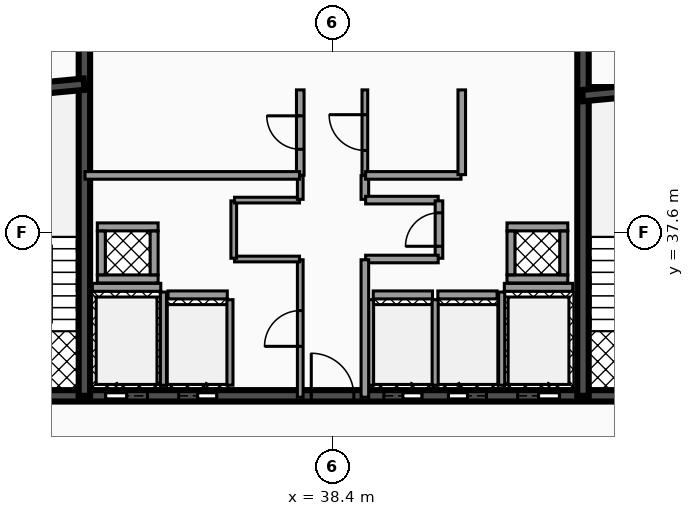
"""IFC4 building model, lengths in metres.
Left out: names, types, materials, properties, quantities, classifications, styles, units other than length and angle.
Written with IfcOpenShell. Run it as: python <this file> out.ifc"""

import sys

from ifc_helpers import new_model, si_unit, direction, frame, frame_2d, origin, place, context, subcontext, project, spatial, rectangle, extrude, element, fill, save


model = new_model("IFC4")
c1 = context("Model", 3, precision=1e-05, world=origin(), true_north=direction((0.0, 1.0)))
c2 = subcontext(c1, "Body", "Model", "MODEL_VIEW")
j1 = project(units=[si_unit("LENGTHUNIT", "METRE"), si_unit("PLANEANGLEUNIT", "RADIAN")], contexts=[c1])
p1 = place(None, origin())
s1 = spatial("IfcSite", under=j1, at=p1, CompositionType="ELEMENT")
p2 = place(p1, origin())
s2 = spatial("IfcBuilding", under=s1, at=p2, CompositionType="ELEMENT")
p3 = place(p2, frame((0.0, 0.0, 258.4)))
s3 = spatial("IfcBuildingStorey", under=s2, at=p3, CompositionType="ELEMENT", Elevation=258.4)
p4 = place(p3, frame((28.5, 33.3, 0.0), z_axis=(0.0, 0.0, 1.0), x_axis=(1.0, 0.0, 0.0)))
e1 = element("IfcWall", 1, at=p4, inside=s3, PredefinedType="SHEAR", context=c2, shape_type="SweptSolid", body=[
    extrude(rectangle(XDim=19.86, YDim=0.3, at=frame_2d((9.93, 0.0))), origin(), (0.0, 0.0, 1.0), 3.18),
])
p5 = place(p4, frame((3.93, 0.0, 0.0)))
e2 = element("IfcOpeningElement", 2, at=p5, cuts=e1, PredefinedType="OPENING", context=c2, shape_type="SweptSolid", body=[
    extrude(rectangle(XDim=1.1, YDim=2.15, at=frame_2d((0.55, 1.075))), frame((0.0, 0.16, 0.0), z_axis=(0.0, -1.0, 0.0), x_axis=(1.0, 0.0, 0.0)), (0.0, 0.0, 1.0), 0.32),
])
p6 = place(p4, frame((14.77, 0.0, 0.0)))
e3 = element("IfcOpeningElement", 3, at=p6, cuts=e1, PredefinedType="OPENING", context=c2, shape_type="SweptSolid", body=[
    extrude(rectangle(XDim=1.1, YDim=2.15, at=frame_2d((0.55, 1.075))), frame((0.0, 0.16, 0.0), z_axis=(0.0, -1.0, 0.0), x_axis=(1.0, 0.0, 0.0)), (0.0, 0.0, 1.0), 0.32),
])
p7 = place(p4, frame((11.25, 0.0, 0.0)))
e4 = element("IfcOpeningElement", 4, at=p7, cuts=e1, PredefinedType="OPENING", context=c2, shape_type="SweptSolid", body=[
    extrude(rectangle(XDim=1.0, YDim=2.1, at=frame_2d((0.5, 1.05))), frame((0.0, 0.16, 0.0), z_axis=(0.0, -1.0, 0.0), x_axis=(1.0, 0.0, 0.0)), (0.0, 0.0, 1.0), 0.32),
])
p8 = place(p4, frame((12.95, 0.0, 0.0)))
e5 = element("IfcOpeningElement", 5, at=p8, cuts=e1, PredefinedType="OPENING", context=c2, shape_type="SweptSolid", body=[
    extrude(rectangle(XDim=1.0, YDim=2.1, at=frame_2d((0.5, 1.05))), frame((0.0, 0.16, 0.0), z_axis=(0.0, -1.0, 0.0), x_axis=(1.0, 0.0, 0.0)), (0.0, 0.0, 1.0), 0.32),
])
p9 = place(p4, frame((5.85, 0.0, 0.0)))
e6 = element("IfcOpeningElement", 6, at=p9, cuts=e1, PredefinedType="OPENING", context=c2, shape_type="SweptSolid", body=[
    extrude(rectangle(XDim=1.0, YDim=2.1, at=frame_2d((0.5, 1.05))), frame((0.0, 0.16, 0.0), z_axis=(0.0, -1.0, 0.0), x_axis=(1.0, 0.0, 0.0)), (0.0, 0.0, 1.0), 0.32),
])
p10 = place(p4, frame((1.21, 0.0, 0.0)))
e7 = element("IfcOpeningElement", 7, at=p10, cuts=e1, PredefinedType="OPENING", context=c2, shape_type="SweptSolid", body=[
    extrude(rectangle(XDim=1.1, YDim=2.2, at=frame_2d((0.55, 1.1))), frame((0.0, 0.16, 0.0), z_axis=(0.0, -1.0, 0.0), x_axis=(1.0, 0.0, 0.0)), (0.0, 0.0, 1.0), 0.32),
])
p11 = place(p4, frame((9.34, 0.0, 0.0)))
e8 = element("IfcOpeningElement", 8, at=p11, cuts=e1, PredefinedType="OPENING", context=c2, shape_type="SweptSolid", body=[
    extrude(rectangle(XDim=1.12, YDim=2.05, at=frame_2d((0.56, 1.025))), frame((0.0, 0.16, 0.0), z_axis=(0.0, -1.0, 0.0), x_axis=(1.0, 0.0, 0.0)), (0.0, 0.0, 1.0), 0.32),
])
p12 = place(p4, frame((17.55, 0.0, 0.0)))
e9 = element("IfcOpeningElement", 9, at=p12, cuts=e1, PredefinedType="OPENING", context=c2, shape_type="SweptSolid", body=[
    extrude(rectangle(XDim=1.1, YDim=2.2, at=frame_2d((0.55, 1.1))), frame((0.0, 0.16, 0.0), z_axis=(0.0, -1.0, 0.0), x_axis=(1.0, 0.0, 0.0)), (0.0, 0.0, 1.0), 0.32),
])
for number, where, z_axis, x_axis in (
    (10, (31.87, 33.3, 0.0), (0.0, 0.0, 1.0), (0.0, 1.0, 0.0)),
    (11, (44.99, 33.3, 0.0), (0.0, 0.0, 1.0), (0.0, 1.0, 0.0)),
):
    element("IfcWall", number, at=place(p3, frame(where, z_axis=z_axis, x_axis=x_axis)), inside=s3, PredefinedType="SHEAR", context=c2, shape_type="SweptSolid", body=[
        extrude(rectangle(XDim=10.1, YDim=0.3, at=frame_2d((5.05, 0.0))), origin(), (0.0, 0.0, 1.0), 3.18),
    ])
p13 = place(p3, frame((28.64, 41.2, 0.0), z_axis=(0.0, 0.0, 1.0), x_axis=(0.995687118776, 0.092774789157, 0.0)))
e12 = element("IfcWall", 12, at=p13, inside=s3, PredefinedType="SHEAR", context=c2, shape_type="SweptSolid", body=[
    extrude(rectangle(XDim=3.234, YDim=0.3, at=frame_2d((1.617, 0.0))), origin(), (0.0, 0.0, 1.0), 3.18),
])
p14 = place(p3, frame((44.98, 41.2, 0.0), z_axis=(0.0, 0.0, 1.0), x_axis=(0.995686468965, 0.09278176286, 0.0)))
e13 = element("IfcWall", 13, at=p14, inside=s3, PredefinedType="SHEAR", context=c2, shape_type="SweptSolid", body=[
    extrude(rectangle(XDim=3.234, YDim=0.3, at=frame_2d((1.617, 0.0))), origin(), (0.0, 0.0, 1.0), 3.18),
])
p15 = place(p3, frame((32.08, 36.155, 0.0), z_axis=(0.0, 0.0, 1.0), x_axis=(1.0, 0.0, 0.0)))
e14 = element("IfcWall", 14, at=p15, inside=s3, PredefinedType="SOLIDWALL", context=c2, shape_type="SweptSolid", body=[
    extrude(rectangle(XDim=1.8, YDim=0.21, at=frame_2d((0.9, 0.0))), origin(), (0.0, 0.0, 1.0), 3.18),
])
p16 = place(p3, frame((33.95, 33.58, 0.0), z_axis=(0.0, 0.0, 1.0), x_axis=(0.0, 1.0, 0.0)))
e15 = element("IfcWall", 15, at=p16, inside=s3, PredefinedType="SOLIDWALL", context=c2, shape_type="SweptSolid", body=[
    extrude(rectangle(XDim=2.45, YDim=0.16, at=frame_2d((1.225, 0.0))), origin(), (0.0, 0.0, 1.0), 3.18),
])
p17 = place(p3, frame((42.92, 36.155, 0.0), z_axis=(0.0, 0.0, 1.0), x_axis=(1.0, 0.0, 0.0)))
e16 = element("IfcWall", 16, at=p17, inside=s3, PredefinedType="SOLIDWALL", context=c2, shape_type="SweptSolid", body=[
    extrude(rectangle(XDim=1.8, YDim=0.21, at=frame_2d((0.9, 0.0))), origin(), (0.0, 0.0, 1.0), 3.18),
])
p18 = place(p3, frame((42.85, 33.58, 0.0), z_axis=(0.0, 0.0, 1.0), x_axis=(0.0, 1.0, 0.0)))
e17 = element("IfcWall", 17, at=p18, inside=s3, PredefinedType="SOLIDWALL", context=c2, shape_type="SweptSolid", body=[
    extrude(rectangle(XDim=2.45, YDim=0.16, at=frame_2d((1.225, 0.0))), origin(), (0.0, 0.0, 1.0), 3.18),
])
p19 = place(p3, frame((39.47, 35.955, 0.0), z_axis=(0.0, 0.0, 1.0), x_axis=(1.0, 0.0, 0.0)))
e18 = element("IfcWall", 18, at=p19, inside=s3, PredefinedType="SOLIDWALL", context=c2, shape_type="SweptSolid", body=[
    extrude(rectangle(XDim=1.56, YDim=0.21, at=frame_2d((0.78, 0.0))), origin(), (0.0, 0.0, 1.0), 3.18),
])
for number, where, z_axis, x_axis in (
    (19, (39.4, 33.58, 0.0), (0.0, 0.0, 1.0), (0.0, 1.0, 0.0)),
    (20, (41.1, 33.58, 0.0), (0.0, 0.0, 1.0), (0.0, 1.0, 0.0)),
):
    element("IfcWall", number, at=place(p3, frame(where, z_axis=z_axis, x_axis=x_axis)), inside=s3, PredefinedType="SOLIDWALL", context=c2, shape_type="SweptSolid", body=[
        extrude(rectangle(XDim=2.25, YDim=0.16, at=frame_2d((1.125, 0.0))), origin(), (0.0, 0.0, 1.0), 3.18),
    ])
p20 = place(p3, frame((41.17, 35.955, 0.0), z_axis=(0.0, 0.0, 1.0), x_axis=(1.0, 0.0, 0.0)))
e21 = element("IfcWall", 21, at=p20, inside=s3, PredefinedType="SOLIDWALL", context=c2, shape_type="SweptSolid", body=[
    extrude(rectangle(XDim=1.56, YDim=0.21, at=frame_2d((0.78, 0.0))), origin(), (0.0, 0.0, 1.0), 3.18),
])
p21 = place(p3, frame((34.07, 35.955, 0.0), z_axis=(0.0, 0.0, 1.0), x_axis=(1.0, 0.0, 0.0)))
e22 = element("IfcWall", 22, at=p21, inside=s3, PredefinedType="SOLIDWALL", context=c2, shape_type="SweptSolid", body=[
    extrude(rectangle(XDim=1.56, YDim=0.21, at=frame_2d((0.78, 0.0))), origin(), (0.0, 0.0, 1.0), 3.18),
])
p22 = place(p3, frame((35.7, 33.58, 0.0), z_axis=(0.0, 0.0, 1.0), x_axis=(0.0, 1.0, 0.0)))
e23 = element("IfcWall", 23, at=p22, inside=s3, PredefinedType="SOLIDWALL", context=c2, shape_type="SweptSolid", body=[
    extrude(rectangle(XDim=2.25, YDim=0.16, at=frame_2d((1.125, 0.0))), origin(), (0.0, 0.0, 1.0), 3.18),
])
for number, where, z_axis, x_axis in (
    (24, (32.21, 36.375, 0.0), (0.0, 0.0, 1.0), (1.0, 0.0, 0.0)),
    (25, (32.21, 37.745, 0.0), (0.0, 0.0, 1.0), (1.0, 0.0, 0.0)),
):
    element("IfcWall", number, at=place(p3, frame(where, z_axis=z_axis, x_axis=x_axis)), inside=s3, PredefinedType="SOLIDWALL", context=c2, shape_type="SweptSolid", body=[
        extrude(rectangle(XDim=1.6, YDim=0.21, at=frame_2d((0.8, 0.0))), origin(), (0.0, 0.0, 1.0), 3.18),
    ])
for number, where, z_axis, x_axis in (
    (26, (32.315, 36.485, 0.0), (0.0, 0.0, 1.0), (0.0, 1.0, 0.0)),
    (27, (33.705, 36.485, 0.0), (0.0, 0.0, 1.0), (0.0, 1.0, 0.0)),
):
    element("IfcWall", number, at=place(p3, frame(where, z_axis=z_axis, x_axis=x_axis)), inside=s3, PredefinedType="SOLIDWALL", context=c2, shape_type="SweptSolid", body=[
        extrude(rectangle(XDim=1.15, YDim=0.21, at=frame_2d((0.575, 0.0))), origin(), (0.0, 0.0, 1.0), 3.18),
    ])
for number, where, z_axis, x_axis in (
    (28, (42.99, 36.375, 0.0), (0.0, 0.0, 1.0), (1.0, 0.0, 0.0)),
    (29, (42.99, 37.745, 0.0), (0.0, 0.0, 1.0), (1.0, 0.0, 0.0)),
):
    element("IfcWall", number, at=place(p3, frame(where, z_axis=z_axis, x_axis=x_axis)), inside=s3, PredefinedType="SOLIDWALL", context=c2, shape_type="SweptSolid", body=[
        extrude(rectangle(XDim=1.6, YDim=0.21, at=frame_2d((0.8, 0.0))), origin(), (0.0, 0.0, 1.0), 3.18),
    ])
for number, where, z_axis, x_axis in (
    (30, (43.095, 36.485, 0.0), (0.0, 0.0, 1.0), (0.0, 1.0, 0.0)),
    (31, (44.485, 36.485, 0.0), (0.0, 0.0, 1.0), (0.0, 1.0, 0.0)),
):
    element("IfcWall", number, at=place(p3, frame(where, z_axis=z_axis, x_axis=x_axis)), inside=s3, PredefinedType="SOLIDWALL", context=c2, shape_type="SweptSolid", body=[
        extrude(rectangle(XDim=1.15, YDim=0.21, at=frame_2d((0.575, 0.0))), origin(), (0.0, 0.0, 1.0), 3.18),
    ])
p23 = place(p3, frame((37.55, 33.265, 0.0), z_axis=(0.0, 0.0, 1.0), x_axis=(0.0, 1.0, 0.0)))
e32 = element("IfcWall", 32, at=p23, inside=s3, PredefinedType="PARTITIONING", context=c2, shape_type="SweptSolid", body=[
    extrude(rectangle(XDim=3.615, YDim=0.15, at=frame_2d((1.808, 0.0))), origin(), (0.0, 0.0, 1.0), 2.235),
])
p24 = place(p23, frame((1.337, 0.0, 0.0)))
e33 = element("IfcOpeningElement", 33, at=p24, cuts=e32, PredefinedType="OPENING", context=c2, shape_type="SweptSolid", body=[
    extrude(rectangle(XDim=0.94, YDim=2.05, at=frame_2d((0.47, 1.025))), frame((0.0, 0.085, 0.0), z_axis=(0.0, -1.0, 0.0), x_axis=(1.0, 0.0, 0.0)), (0.0, 0.0, 1.0), 0.17),
])
p25 = place(p3, frame((35.82, 36.9, 0.0), z_axis=(0.0, 0.0, 1.0), x_axis=(1.0, 0.0, 0.0)))
e34 = element("IfcWall", 34, at=p25, inside=s3, PredefinedType="PARTITIONING", context=c2, shape_type="SweptSolid", body=[
    extrude(rectangle(XDim=1.71, YDim=0.15, at=frame_2d((0.855, 0.0))), origin(), (0.0, 0.0, 1.0), 2.235),
])
p26 = place(p3, frame((35.8, 36.92, 0.0), z_axis=(0.0, 0.0, 1.0), x_axis=(0.0, 1.0, 0.0)))
e35 = element("IfcWall", 35, at=p26, inside=s3, PredefinedType="PARTITIONING", context=c2, shape_type="SweptSolid", body=[
    extrude(rectangle(XDim=1.51, YDim=0.15, at=frame_2d((0.755, 0.0))), origin(), (0.0, 0.0, 1.0), 2.235),
])
p27 = place(p3, frame((35.82, 38.45, 0.0), z_axis=(0.0, 0.0, 1.0), x_axis=(1.0, 0.0, 0.0)))
e36 = element("IfcWall", 36, at=p27, inside=s3, PredefinedType="PARTITIONING", context=c2, shape_type="SweptSolid", body=[
    extrude(rectangle(XDim=1.71, YDim=0.15, at=frame_2d((0.855, 0.0))), origin(), (0.0, 0.0, 1.0), 2.235),
])
p28 = place(p3, frame((37.55, 38.47, 0.0), z_axis=(0.0, 0.0, 1.0), x_axis=(0.0, 1.0, 0.0)))
e37 = element("IfcWall", 37, at=p28, inside=s3, PredefinedType="PARTITIONING", context=c2, shape_type="SweptSolid", body=[
    extrude(rectangle(XDim=0.625, YDim=0.15, at=frame_2d((0.312, 0.0))), origin(), (0.0, 0.0, 1.0), 2.235),
])
p29 = place(p3, frame((37.55, 39.105, 0.0), z_axis=(0.0, 0.0, 1.0), x_axis=(0.0, 1.0, 0.0)))
e38 = element("IfcWall", 38, at=p29, inside=s3, PredefinedType="PARTITIONING", context=c2, shape_type="SweptSolid", body=[
    extrude(rectangle(XDim=2.245, YDim=0.2, at=frame_2d((1.123, 0.0))), origin(), (0.0, 0.0, 1.0), 2.235),
])
p30 = place(p29, frame((0.683, 0.0, 0.0)))
e39 = element("IfcOpeningElement", 39, at=p30, cuts=e38, PredefinedType="OPENING", context=c2, shape_type="SweptSolid", body=[
    extrude(rectangle(XDim=0.88, YDim=2.05, at=frame_2d((0.44, 1.025))), frame((0.0, 0.11, 0.0), z_axis=(0.0, -1.0, 0.0), x_axis=(1.0, 0.0, 0.0)), (0.0, 0.0, 1.0), 0.22),
])
p31 = place(p3, frame((39.25, 38.47, 0.0), z_axis=(0.0, 0.0, 1.0), x_axis=(0.0, 1.0, 0.0)))
e40 = element("IfcWall", 40, at=p31, inside=s3, PredefinedType="PARTITIONING", context=c2, shape_type="SweptSolid", body=[
    extrude(rectangle(XDim=0.625, YDim=0.2, at=frame_2d((0.312, 0.0))), origin(), (0.0, 0.0, 1.0), 2.235),
])
p32 = place(p3, frame((39.27, 38.45, 0.0), z_axis=(0.0, 0.0, 1.0), x_axis=(1.0, 0.0, 0.0)))
e41 = element("IfcWall", 41, at=p32, inside=s3, PredefinedType="PARTITIONING", context=c2, shape_type="SweptSolid", body=[
    extrude(rectangle(XDim=1.91, YDim=0.2, at=frame_2d((0.955, 0.0))), origin(), (0.0, 0.0, 1.0), 2.235),
])
p33 = place(p3, frame((41.2, 36.92, 0.0), z_axis=(0.0, 0.0, 1.0), x_axis=(0.0, 1.0, 0.0)))
e42 = element("IfcWall", 42, at=p33, inside=s3, PredefinedType="PARTITIONING", context=c2, shape_type="SweptSolid", body=[
    extrude(rectangle(XDim=1.51, YDim=0.2, at=frame_2d((0.755, 0.0))), origin(), (0.0, 0.0, 1.0), 2.235),
])
p34 = place(p33, frame((0.315, 0.0, 0.0)))
e43 = element("IfcOpeningElement", 43, at=p34, cuts=e42, PredefinedType="OPENING", context=c2, shape_type="SweptSolid", body=[
    extrude(rectangle(XDim=0.88, YDim=2.05, at=frame_2d((0.44, 1.025))), frame((0.0, 0.11, 0.0), z_axis=(0.0, -1.0, 0.0), x_axis=(1.0, 0.0, 0.0)), (0.0, 0.0, 1.0), 0.22),
])
p35 = place(p3, frame((39.27, 36.9, 0.0), z_axis=(0.0, 0.0, 1.0), x_axis=(1.0, 0.0, 0.0)))
e44 = element("IfcWall", 44, at=p35, inside=s3, PredefinedType="PARTITIONING", context=c2, shape_type="SweptSolid", body=[
    extrude(rectangle(XDim=1.91, YDim=0.2, at=frame_2d((0.955, 0.0))), origin(), (0.0, 0.0, 1.0), 2.235),
])
p36 = place(p3, frame((39.25, 33.265, 0.0), z_axis=(0.0, 0.0, 1.0), x_axis=(0.0, 1.0, 0.0)))
e45 = element("IfcWall", 45, at=p36, inside=s3, PredefinedType="PARTITIONING", context=c2, shape_type="SweptSolid", body=[
    extrude(rectangle(XDim=3.615, YDim=0.2, at=frame_2d((1.808, 0.0))), origin(), (0.0, 0.0, 1.0), 2.235),
])
p37 = place(p3, frame((39.25, 39.105, 0.0), z_axis=(0.0, 0.0, 1.0), x_axis=(0.0, 1.0, 0.0)))
e46 = element("IfcWall", 46, at=p37, inside=s3, PredefinedType="PARTITIONING", context=c2, shape_type="SweptSolid", body=[
    extrude(rectangle(XDim=2.245, YDim=0.15, at=frame_2d((1.123, 0.0))), origin(), (0.0, 0.0, 1.0), 2.235),
])
p38 = place(p37, frame((0.653, 0.0, 0.0)))
e47 = element("IfcOpeningElement", 47, at=p38, cuts=e46, PredefinedType="OPENING", context=c2, shape_type="SweptSolid", body=[
    extrude(rectangle(XDim=0.94, YDim=2.05, at=frame_2d((0.47, 1.025))), frame((0.0, 0.085, 0.0), z_axis=(0.0, -1.0, 0.0), x_axis=(1.0, 0.0, 0.0)), (0.0, 0.0, 1.0), 0.17),
])
p39 = place(p3, frame((31.885, 39.1, 0.0), z_axis=(0.0, 0.0, 1.0), x_axis=(1.0, 0.0, 0.0)))
e48 = element("IfcWall", 48, at=p39, inside=s3, PredefinedType="PARTITIONING", context=c2, shape_type="SweptSolid", body=[
    extrude(rectangle(XDim=5.645, YDim=0.2, at=frame_2d((2.823, 0.0))), origin(), (0.0, 0.0, 1.0), 2.235),
])
p40 = place(p3, frame((39.27, 39.1, 0.0), z_axis=(0.0, 0.0, 1.0), x_axis=(1.0, 0.0, 0.0)))
e49 = element("IfcWall", 49, at=p40, inside=s3, PredefinedType="PARTITIONING", context=c2, shape_type="SweptSolid", body=[
    extrude(rectangle(XDim=2.51, YDim=0.2, at=frame_2d((1.255, 0.0))), origin(), (0.0, 0.0, 1.0), 2.235),
])
p41 = place(p3, frame((41.8, 39.12, 0.0), z_axis=(0.0, 0.0, 1.0), x_axis=(0.0, 1.0, 0.0)))
e50 = element("IfcWall", 50, at=p41, inside=s3, PredefinedType="PARTITIONING", context=c2, shape_type="SweptSolid", body=[
    extrude(rectangle(XDim=2.23, YDim=0.2, at=frame_2d((1.115, 0.0))), origin(), (0.0, 0.0, 1.0), 2.235),
])
p42 = place(p5, origin())
e51 = element("IfcDoor", 51, at=p42, inside=s3, OperationType="SLIDING_TO_LEFT", PredefinedType="DOOR", context=c2, shape_type="SweptSolid", body=[
    extrude(rectangle(XDim=1.1, YDim=2.15, at=frame_2d((0.55, 1.075))), frame((0.0, 0.025, 0.0), z_axis=(0.0, -1.0, 0.0), x_axis=(1.0, 0.0, 0.0)), (0.0, 0.0, 1.0), 0.05),
])
fill(e2, e51)
p43 = place(p6, origin())
e52 = element("IfcDoor", 52, at=p43, inside=s3, OperationType="SLIDING_TO_RIGHT", PredefinedType="DOOR", context=c2, shape_type="SweptSolid", body=[
    extrude(rectangle(XDim=1.1, YDim=2.15, at=frame_2d((0.55, 1.075))), frame((0.0, 0.025, 0.0), z_axis=(0.0, -1.0, 0.0), x_axis=(1.0, 0.0, 0.0)), (0.0, 0.0, 1.0), 0.05),
])
fill(e3, e52)
p44 = place(p7, origin())
e53 = element("IfcDoor", 53, at=p44, inside=s3, OperationType="SLIDING_TO_RIGHT", PredefinedType="DOOR", context=c2, shape_type="SweptSolid", body=[
    extrude(rectangle(XDim=1.0, YDim=2.1, at=frame_2d((0.5, 1.05))), frame((0.0, 0.025, 0.0), z_axis=(0.0, -1.0, 0.0), x_axis=(1.0, 0.0, 0.0)), (0.0, 0.0, 1.0), 0.05),
])
fill(e4, e53)
p45 = place(p8, origin())
e54 = element("IfcDoor", 54, at=p45, inside=s3, OperationType="SLIDING_TO_LEFT", PredefinedType="DOOR", context=c2, shape_type="SweptSolid", body=[
    extrude(rectangle(XDim=1.0, YDim=2.1, at=frame_2d((0.5, 1.05))), frame((0.0, 0.025, 0.0), z_axis=(0.0, -1.0, 0.0), x_axis=(1.0, 0.0, 0.0)), (0.0, 0.0, 1.0), 0.05),
])
fill(e5, e54)
p46 = place(p9, origin())
e55 = element("IfcDoor", 55, at=p46, inside=s3, OperationType="SLIDING_TO_RIGHT", PredefinedType="DOOR", context=c2, shape_type="SweptSolid", body=[
    extrude(rectangle(XDim=1.0, YDim=2.1, at=frame_2d((0.5, 1.05))), frame((0.0, 0.025, 0.0), z_axis=(0.0, -1.0, 0.0), x_axis=(1.0, 0.0, 0.0)), (0.0, 0.0, 1.0), 0.05),
])
fill(e6, e55)
p47 = place(p11, origin())
e56 = element("IfcDoor", 56, at=p47, inside=s3, OperationType="SINGLE_SWING_LEFT", PredefinedType="DOOR", context=c2, shape_type="SweptSolid", body=[
    extrude(rectangle(XDim=1.12, YDim=2.05, at=frame_2d((0.56, 1.025))), frame((0.0, 0.025, 0.0), z_axis=(0.0, -1.0, 0.0), x_axis=(1.0, 0.0, 0.0)), (0.0, 0.0, 1.0), 0.05),
])
fill(e8, e56)
p48 = place(p24, origin())
e57 = element("IfcDoor", 57, at=p48, inside=s3, OperationType="SINGLE_SWING_LEFT", PredefinedType="DOOR", context=c2, shape_type="SweptSolid", body=[
    extrude(rectangle(XDim=0.94, YDim=2.05, at=frame_2d((0.47, 1.025))), frame((0.0, 0.025, 0.0), z_axis=(0.0, -1.0, 0.0), x_axis=(1.0, 0.0, 0.0)), (0.0, 0.0, 1.0), 0.05),
])
fill(e33, e57)
p49 = place(p30, origin())
e58 = element("IfcDoor", 58, at=p49, inside=s3, OperationType="SINGLE_SWING_RIGHT", PredefinedType="DOOR", context=c2, shape_type="SweptSolid", body=[
    extrude(rectangle(XDim=0.88, YDim=2.05, at=frame_2d((0.44, 1.025))), frame((0.0, 0.025, 0.0), z_axis=(0.0, -1.0, 0.0), x_axis=(1.0, 0.0, 0.0)), (0.0, 0.0, 1.0), 0.05),
])
fill(e39, e58)
p50 = place(p34, origin())
e59 = element("IfcDoor", 59, at=p50, inside=s3, OperationType="SINGLE_SWING_LEFT", PredefinedType="DOOR", context=c2, shape_type="SweptSolid", body=[
    extrude(rectangle(XDim=0.88, YDim=2.05, at=frame_2d((0.44, 1.025))), frame((0.0, 0.025, 0.0), z_axis=(0.0, -1.0, 0.0), x_axis=(1.0, 0.0, 0.0)), (0.0, 0.0, 1.0), 0.05),
])
fill(e43, e59)
p51 = place(p38, origin())
e60 = element("IfcDoor", 60, at=p51, inside=s3, OperationType="SINGLE_SWING_RIGHT", PredefinedType="DOOR", context=c2, shape_type="SweptSolid", body=[
    extrude(rectangle(XDim=0.94, YDim=2.05, at=frame_2d((0.47, 1.025))), frame((0.0, 0.025, 0.0), z_axis=(0.0, -1.0, 0.0), x_axis=(1.0, 0.0, 0.0)), (0.0, 0.0, 1.0), 0.05),
])
fill(e47, e60)
save(model, sys.argv[1])
